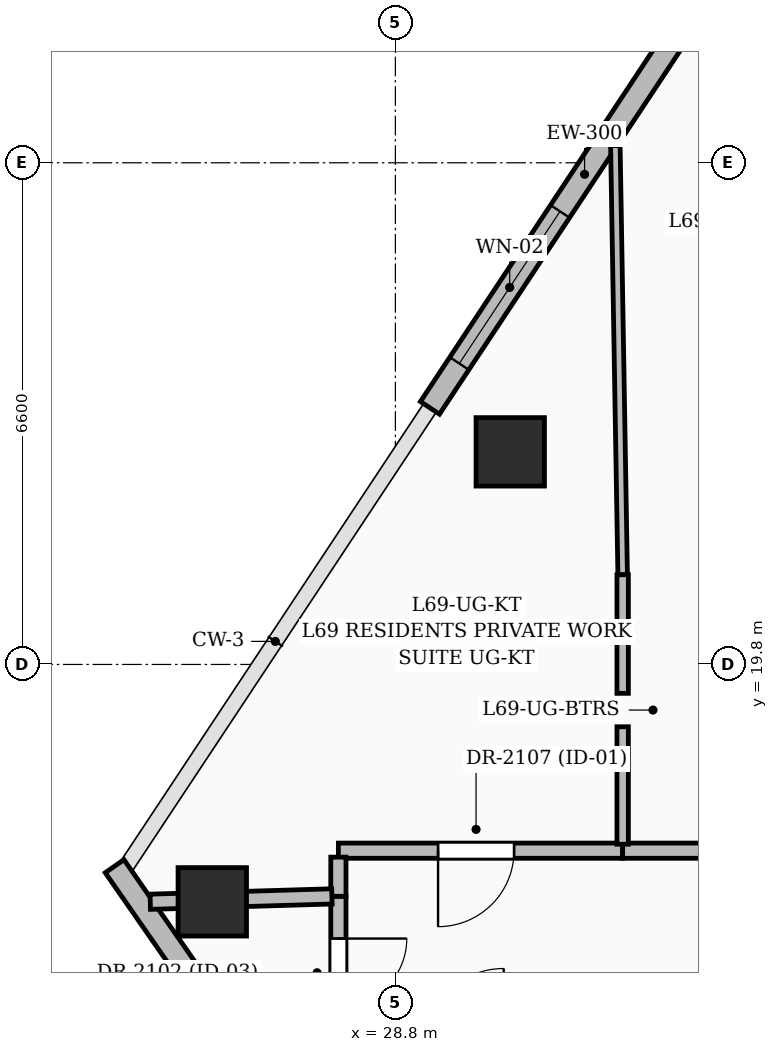
"""IFC4 building model, lengths in metres.
Left out: names, types, materials, properties, quantities, classifications, styles, units other than length and angle.
Written with IfcOpenShell. Run it as: python <this file> out.ifc"""

import sys

from ifc_helpers import new_model, si_unit, direction, frame, frame_2d, origin, origin_2d, place, context, subcontext, project, spatial, rectangle, extrude, element, fill, save


model = new_model("IFC4")
c1 = context("Model", 3, precision=1e-05, world=origin(), true_north=direction((0.0, 1.0)))
c2 = subcontext(c1, "Body", "Model", "MODEL_VIEW")
j1 = project(units=[si_unit("LENGTHUNIT", "METRE"), si_unit("PLANEANGLEUNIT", "RADIAN")], contexts=[c1])
p1 = place(None, origin())
s1 = spatial("IfcSite", under=j1, at=p1, CompositionType="ELEMENT")
p2 = place(p1, origin())
s2 = spatial("IfcBuilding", under=s1, at=p2, CompositionType="ELEMENT")
p3 = place(p2, frame((0.0, 0.0, 267.0)))
s3 = spatial("IfcBuildingStorey", under=s2, at=p3, CompositionType="ELEMENT", Elevation=267.0)
for number, where, z_axis, x_axis in (
    (1, (30.311, 22.597, 0.0), (0.0, 0.0, 1.0), (1.0, 0.0, 0.0)),
    (2, (26.391, 16.677, 0.0), (0.0, 0.0, 1.0), (1.0, 0.0, 0.0)),
):
    element("IfcColumn", number, at=place(p3, frame(where, z_axis=z_axis, x_axis=x_axis)), inside=s3, PredefinedType="COLUMN", context=c2, shape_type="SweptSolid", body=[
        extrude(rectangle(XDim=0.9, YDim=0.9, at=origin_2d()), origin(), (0.0, 0.0, 1.0), 3.75),
    ])
p4 = place(p3, frame((26.586, 15.017, 0.0), z_axis=(0.0, 0.0, 1.0), x_axis=(-0.570741639744, 0.821129697833, 0.0)))
e3 = element("IfcWall", 3, at=p4, inside=s3, PredefinedType="SOLIDWALL", context=c2, shape_type="SweptSolid", body=[
    extrude(rectangle(XDim=2.593, YDim=0.3, at=frame_2d((1.296, 0.0))), origin(), (0.0, 0.0, 1.0), 2.825),
])
p5 = place(p3, frame((29.255, 23.176, 0.0), z_axis=(0.0, 0.0, 1.0), x_axis=(0.552090496284, 0.833784195048, 0.0)))
e4 = element("IfcWall", 4, at=p5, inside=s3, PredefinedType="SOLIDWALL", context=c2, shape_type="SweptSolid", body=[
    extrude(rectangle(XDim=7.369, YDim=0.3, at=frame_2d((3.685, 0.0))), origin(), (0.0, 0.0, 1.0), 3.5),
])
p6 = place(p5, frame((0.7, 0.0, 0.6)))
e5 = element("IfcOpeningElement", 5, at=p6, cuts=e4, PredefinedType="OPENING", context=c2, shape_type="SweptSolid", body=[
    extrude(rectangle(XDim=2.4, YDim=2.1, at=frame_2d((1.2, 1.05))), frame((0.0, 0.16, 0.0), z_axis=(0.0, -1.0, 0.0), x_axis=(1.0, 0.0, 0.0)), (0.0, 0.0, 1.0), 0.32),
])
p7 = place(p3, frame((28.05, 16.75, 0.0), z_axis=(0.0, 0.0, 1.0), x_axis=(0.0, -1.0, 0.0)))
e6 = element("IfcWall", 6, at=p7, inside=s3, PredefinedType="PARTITIONING", context=c2, shape_type="SweptSolid", body=[
    extrude(rectangle(XDim=1.7, YDim=0.2, at=frame_2d((0.85, 0.0))), origin(), (0.0, 0.0, 1.0), 3.5),
])
p8 = place(p7, frame((0.556, 0.0, 0.0)))
e7 = element("IfcOpeningElement", 7, at=p8, cuts=e6, PredefinedType="OPENING", context=c2, shape_type="SweptSolid", body=[
    extrude(rectangle(XDim=0.9, YDim=2.1, at=frame_2d((0.45, 1.05))), frame((0.0, 0.11, 0.0), z_axis=(0.0, -1.0, 0.0), x_axis=(1.0, 0.0, 0.0)), (0.0, 0.0, 1.0), 0.22),
])
p9 = place(p3, frame((31.79, 17.35, 0.0), z_axis=(0.0, 0.0, 1.0), x_axis=(-1.0, 0.0, 0.0)))
e8 = element("IfcWall", 8, at=p9, inside=s3, PredefinedType="PARTITIONING", context=c2, shape_type="SweptSolid", body=[
    extrude(rectangle(XDim=3.74, YDim=0.2, at=frame_2d((1.87, 0.0))), origin(), (0.0, 0.0, 1.0), 3.5),
])
p10 = place(p9, frame((1.429, 0.0, 0.0)))
e9 = element("IfcOpeningElement", 9, at=p10, cuts=e8, PredefinedType="OPENING", context=c2, shape_type="SweptSolid", body=[
    extrude(rectangle(XDim=1.0, YDim=2.2, at=frame_2d((0.5, 1.1))), frame((0.0, 0.11, 0.0), z_axis=(0.0, -1.0, 0.0), x_axis=(1.0, 0.0, 0.0)), (0.0, 0.0, 1.0), 0.22),
])
p11 = place(p3, frame((28.05, 17.265, 0.0), z_axis=(0.0, 0.0, 1.0), x_axis=(0.0, -1.0, 0.0)))
e10 = element("IfcWall", 10, at=p11, inside=s3, PredefinedType="PARTITIONING", context=c2, shape_type="SweptSolid", body=[
    extrude(rectangle(XDim=0.515, YDim=0.2, at=frame_2d((0.257, 0.0))), origin(), (0.0, 0.0, 1.0), 3.5),
])
p12 = place(p3, frame((36.165, 17.35, 0.0), z_axis=(0.0, 0.0, 1.0), x_axis=(-1.0, 0.0, 0.0)))
e11 = element("IfcWall", 11, at=p12, inside=s3, PredefinedType="PARTITIONING", context=c2, shape_type="SweptSolid", body=[
    extrude(rectangle(XDim=4.375, YDim=0.2, at=frame_2d((2.188, 0.0))), origin(), (0.0, 0.0, 1.0), 2.685),
])
p13 = place(p3, frame((27.965, 16.749, 0.0), z_axis=(0.0, 0.0, 1.0), x_axis=(-0.999564571774, -0.029507064478, 0.0)))
e12 = element("IfcWall", 12, at=p13, inside=s3, PredefinedType="PARTITIONING", context=c2, shape_type="SweptSolid", body=[
    extrude(rectangle(XDim=2.391, YDim=0.2, at=frame_2d((1.196, 0.0))), origin(), (0.0, 0.0, 1.0), 3.5),
])
p14 = place(p3, frame((31.694, 26.626, 0.0), z_axis=(0.0, 0.0, 1.0), x_axis=(0.016991406417, -0.999855635633, 0.0)))
e13 = element("IfcWall", 13, at=p14, inside=s3, PredefinedType="PARTITIONING", context=c2, shape_type="SweptSolid", body=[
    extrude(rectangle(XDim=5.647, YDim=0.125, at=frame_2d((2.823, 0.0))), origin(), (0.0, 0.0, 1.0), 1.27),
])
p15 = place(p3, frame((31.79, 17.435, 0.0), z_axis=(0.0, 0.0, 1.0), x_axis=(0.0, 1.0, 0.0)))
e14 = element("IfcWall", 14, at=p15, inside=s3, PredefinedType="PARTITIONING", context=c2, shape_type="SweptSolid", body=[
    extrude(rectangle(XDim=1.545, YDim=0.15, at=frame_2d((0.772, 0.0))), origin(), (0.0, 0.0, 1.0), 3.5),
])
p16 = place(p3, frame((31.79, 19.42, 0.0), z_axis=(0.0, 0.0, 1.0), x_axis=(0.0, 1.0, 0.0)))
e15 = element("IfcWall", 15, at=p16, inside=s3, PredefinedType="PARTITIONING", context=c2, shape_type="SweptSolid", body=[
    extrude(rectangle(XDim=1.56, YDim=0.15, at=frame_2d((0.78, 0.0))), origin(), (0.0, 0.0, 1.0), 1.27),
])
p17 = place(p6, origin())
e16 = element("IfcWindow", 16, at=p17, inside=s3, PartitioningType="SINGLE_PANEL", PredefinedType="WINDOW", context=c2, shape_type="SweptSolid", body=[
    extrude(rectangle(XDim=2.4, YDim=2.1, at=frame_2d((1.2, 1.05))), frame((0.0, 0.03, 0.0), z_axis=(0.0, -1.0, 0.0), x_axis=(1.0, 0.0, 0.0)), (0.0, 0.0, 1.0), 0.06),
])
fill(e5, e16)
p18 = place(p8, origin())
e17 = element("IfcDoor", 17, at=p18, inside=s3, OperationType="SINGLE_SWING_LEFT", PredefinedType="DOOR", context=c2, shape_type="SweptSolid", body=[
    extrude(rectangle(XDim=0.9, YDim=2.1, at=frame_2d((0.45, 1.05))), frame((0.0, 0.025, 0.0), z_axis=(0.0, -1.0, 0.0), x_axis=(1.0, 0.0, 0.0)), (0.0, 0.0, 1.0), 0.05),
])
fill(e7, e17)
p19 = place(p10, origin())
e18 = element("IfcDoor", 18, at=p19, inside=s3, OperationType="SINGLE_SWING_RIGHT", PredefinedType="DOOR", context=c2, shape_type="SweptSolid", body=[
    extrude(rectangle(XDim=1.0, YDim=2.2, at=frame_2d((0.5, 1.1))), frame((0.0, 0.025, 0.0), z_axis=(0.0, -1.0, 0.0), x_axis=(1.0, 0.0, 0.0)), (0.0, 0.0, 1.0), 0.05),
])
fill(e9, e18)
save(model, sys.argv[1])
